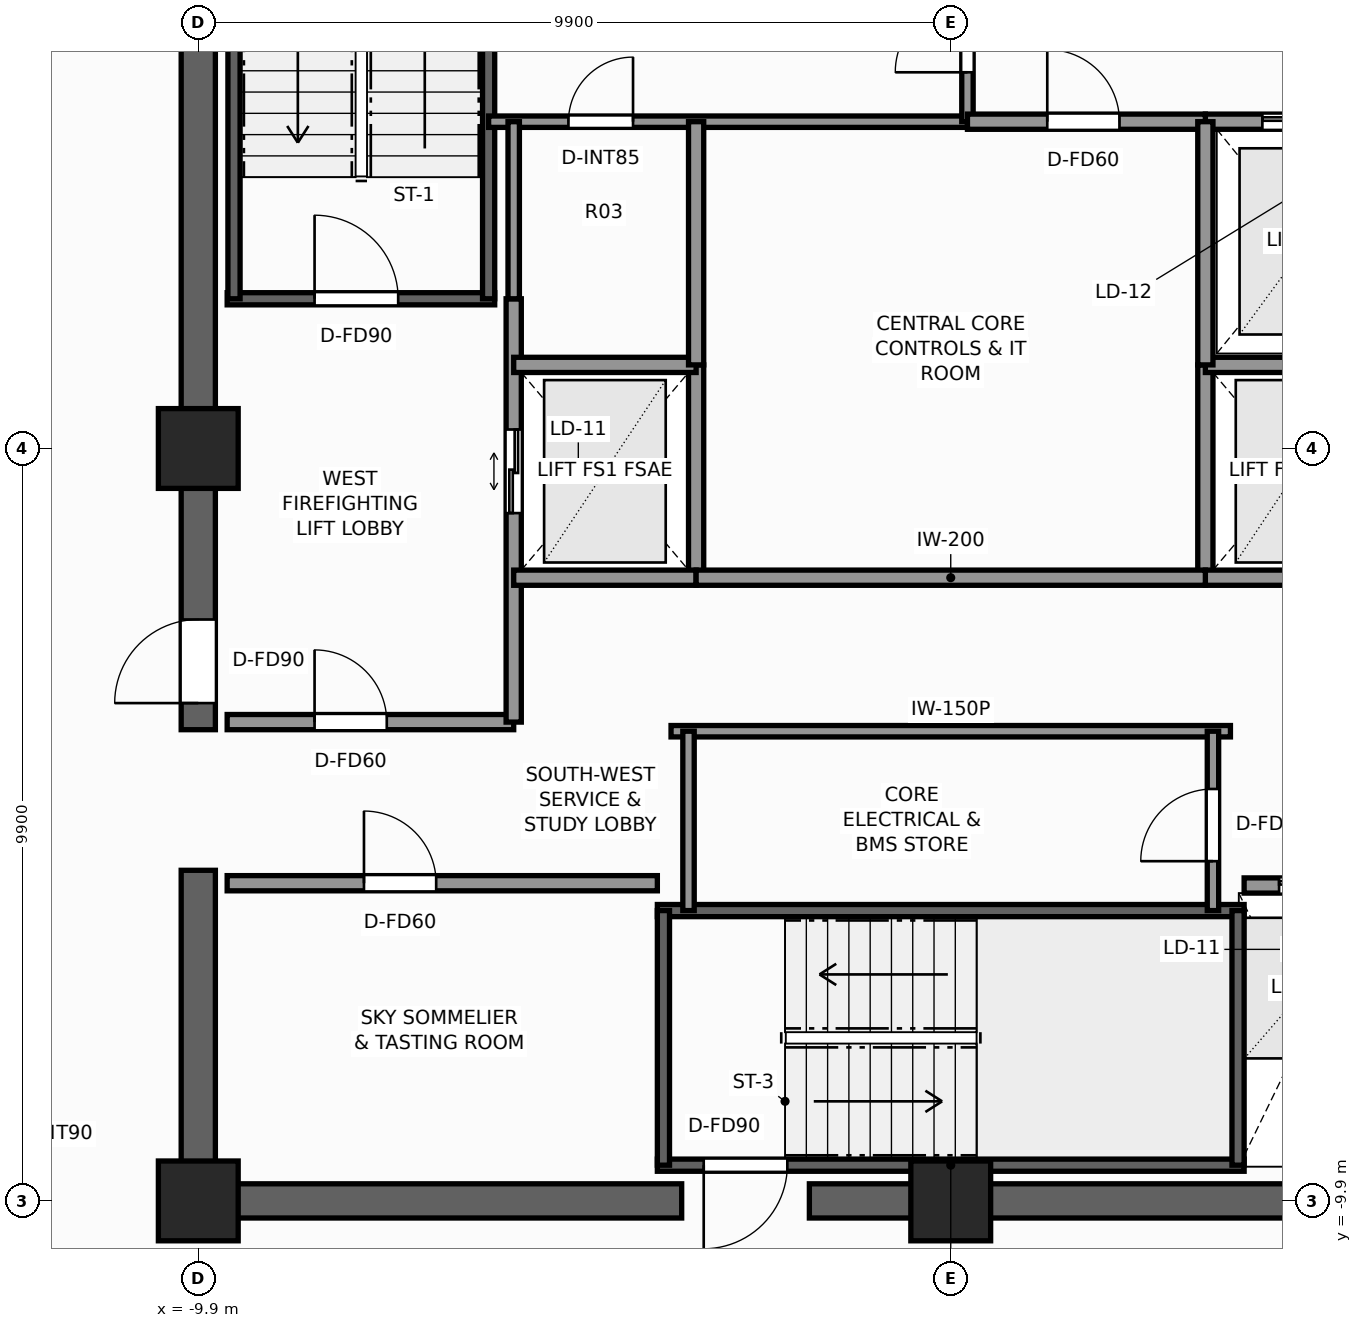
"""IFC4 building model, lengths in metres.
Left out: names, types, materials, properties, quantities, classifications, styles, units other than length and angle.
Written with IfcOpenShell. Run it as: python <this file> out.ifc"""

import sys

from ifc_helpers import new_model, si_unit, direction, frame, frame_2d, origin, origin_2d, place, context, subcontext, project, spatial, rectangle, extrude, element, fill, save


model = new_model("IFC4")
c1 = context("Model", 3, precision=1e-05, world=origin(), true_north=direction((0.0, 1.0)))
c2 = subcontext(c1, "Body", "Model", "MODEL_VIEW")
j1 = project(units=[si_unit("LENGTHUNIT", "METRE"), si_unit("PLANEANGLEUNIT", "RADIAN")], contexts=[c1])
p1 = place(None, origin())
s1 = spatial("IfcSite", under=j1, at=p1, CompositionType="ELEMENT")
p2 = place(p1, origin())
s2 = spatial("IfcBuilding", under=s1, at=p2, CompositionType="ELEMENT")
p3 = place(p2, frame((0.0, 0.0, 247.9)))
s3 = spatial("IfcBuildingStorey", under=s2, at=p3, CompositionType="ELEMENT", Elevation=247.9)
p4 = place(p3, frame((10.125, -9.9, 0.0), z_axis=(0.0, 0.0, 1.0), x_axis=(-1.0, 0.0, 0.0)))
e1 = element("IfcWall", 1, at=p4, inside=s3, PredefinedType="SHEAR", context=c2, shape_type="SweptSolid", body=[
    extrude(rectangle(XDim=11.985, YDim=0.45, at=frame_2d((5.993, 0.0))), origin(), (0.0, 0.0, 1.0), 3.5),
])
p5 = place(p3, frame((-3.54, -9.9, 0.0), z_axis=(0.0, 0.0, 1.0), x_axis=(-1.0, 0.0, 0.0)))
e2 = element("IfcWall", 2, at=p5, inside=s3, PredefinedType="SHEAR", context=c2, shape_type="SweptSolid", body=[
    extrude(rectangle(XDim=6.585, YDim=0.45, at=frame_2d((3.292, 0.0))), origin(), (0.0, 0.0, 1.0), 3.5),
])
p6 = place(p3, frame((-9.9, -9.675, 0.0), z_axis=(0.0, 0.0, 1.0), x_axis=(0.0, 1.0, 0.0)))
e3 = element("IfcWall", 3, at=p6, inside=s3, PredefinedType="SHEAR", context=c2, shape_type="SweptSolid", body=[
    extrude(rectangle(XDim=4.125, YDim=0.45, at=frame_2d((2.062, 0.0))), origin(), (0.0, 0.0, 1.0), 3.5),
])
p7 = place(p3, frame((-9.9, -3.7, 0.0), z_axis=(0.0, 0.0, 1.0), x_axis=(0.0, 1.0, 0.0)))
e4 = element("IfcWall", 4, at=p7, inside=s3, PredefinedType="SHEAR", context=c2, shape_type="SweptSolid", body=[
    extrude(rectangle(XDim=13.375, YDim=0.45, at=frame_2d((6.688, 0.0))), origin(), (0.0, 0.0, 1.0), 3.5),
])
p8 = place(p7, frame((0.35, 0.0, 0.0)))
e5 = element("IfcOpeningElement", 5, at=p8, cuts=e4, PredefinedType="OPENING", context=c2, shape_type="SweptSolid", body=[
    extrude(rectangle(XDim=1.1, YDim=2.2, at=frame_2d((0.55, 1.1))), frame((0.0, 0.235, 0.0), z_axis=(0.0, -1.0, 0.0), x_axis=(1.0, 0.0, 0.0)), (0.0, 0.0, 1.0), 0.47),
])
for number, where, z_axis, x_axis in (
    (6, (-9.9, -9.9, 0.0), (0.0, 0.0, 1.0), (1.0, 0.0, 0.0)),
    (7, (0.0, -9.9, 0.0), (0.0, 0.0, 1.0), (1.0, 0.0, 0.0)),
    (8, (-9.9, 0.0, 0.0), (0.0, 0.0, 1.0), (1.0, 0.0, 0.0)),
):
    element("IfcColumn", number, at=place(p3, frame(where, z_axis=z_axis, x_axis=x_axis)), inside=s3, PredefinedType="COLUMN", context=c2, shape_type="SweptSolid", body=[
        extrude(rectangle(XDim=1.05, YDim=1.05, at=origin_2d()), origin(), (0.0, 0.0, 1.0), 3.5),
    ])
p9 = place(p3, frame((-9.52, 1.97, 0.0), z_axis=(0.0, 0.0, 1.0), x_axis=(1.0, 0.0, 0.0)))
e9 = element("IfcWall", 9, at=p9, inside=s3, PredefinedType="SHEAR", context=c2, shape_type="SweptSolid", body=[
    extrude(rectangle(XDim=3.52, YDim=0.16, at=frame_2d((1.76, 0.0))), origin(), (0.0, 0.0, 1.0), 3.5),
])
p10 = place(p9, frame((1.15, 0.0, 0.0)))
e10 = element("IfcOpeningElement", 10, at=p10, cuts=e9, PredefinedType="OPENING", context=c2, shape_type="SweptSolid", body=[
    extrude(rectangle(XDim=1.1, YDim=2.2, at=frame_2d((0.55, 1.1))), frame((0.0, 0.09, 0.0), z_axis=(0.0, -1.0, 0.0), x_axis=(1.0, 0.0, 0.0)), (0.0, 0.0, 1.0), 0.18),
])
for number, where, z_axis, x_axis in (
    (11, (-9.43, 1.97, 0.0), (0.0, 0.0, 1.0), (0.0, 1.0, 0.0)),
    (12, (-6.08, 1.97, 0.0), (0.0, 0.0, 1.0), (0.0, 1.0, 0.0)),
):
    element("IfcWall", number, at=place(p3, frame(where, z_axis=z_axis, x_axis=x_axis)), inside=s3, PredefinedType="SHEAR", context=c2, shape_type="SweptSolid", body=[
        extrude(rectangle(XDim=7.56, YDim=0.16, at=frame_2d((3.78, 0.0))), origin(), (0.0, 0.0, 1.0), 3.5),
    ])
p11 = place(p3, frame((3.86, -9.43, 0.0), z_axis=(0.0, 0.0, 1.0), x_axis=(-1.0, 0.0, 0.0)))
e13 = element("IfcWall", 13, at=p11, inside=s3, PredefinedType="SHEAR", context=c2, shape_type="SweptSolid", body=[
    extrude(rectangle(XDim=7.72, YDim=0.16, at=frame_2d((3.86, 0.0))), origin(), (0.0, 0.0, 1.0), 3.5),
])
p12 = place(p11, frame((6.01, 0.0, 0.0)))
e14 = element("IfcOpeningElement", 14, at=p12, cuts=e13, PredefinedType="OPENING", context=c2, shape_type="SweptSolid", body=[
    extrude(rectangle(XDim=1.1, YDim=2.2, at=frame_2d((0.55, 1.1))), frame((0.0, 0.09, 0.0), z_axis=(0.0, -1.0, 0.0), x_axis=(1.0, 0.0, 0.0)), (0.0, 0.0, 1.0), 0.18),
])
p13 = place(p3, frame((-3.86, -6.08, 0.0), z_axis=(0.0, 0.0, 1.0), x_axis=(1.0, 0.0, 0.0)))
e15 = element("IfcWall", 15, at=p13, inside=s3, PredefinedType="SHEAR", context=c2, shape_type="SweptSolid", body=[
    extrude(rectangle(XDim=7.72, YDim=0.16, at=frame_2d((3.86, 0.0))), origin(), (0.0, 0.0, 1.0), 3.5),
])
for number, where, z_axis, x_axis in (
    (16, (-3.78, -9.43, 0.0), (0.0, 0.0, 1.0), (0.0, 1.0, 0.0)),
    (17, (3.78, -9.43, 0.0), (0.0, 0.0, 1.0), (0.0, 1.0, 0.0)),
):
    element("IfcWall", number, at=place(p3, frame(where, z_axis=z_axis, x_axis=x_axis)), inside=s3, PredefinedType="SHEAR", context=c2, shape_type="SweptSolid", body=[
        extrude(rectangle(XDim=3.35, YDim=0.16, at=frame_2d((1.675, 0.0))), origin(), (0.0, 0.0, 1.0), 3.5),
    ])
p14 = place(p3, frame((-9.52, -3.6, 0.0), z_axis=(0.0, 0.0, 1.0), x_axis=(1.0, 0.0, 0.0)))
e18 = element("IfcWall", 18, at=p14, inside=s3, PredefinedType="SOLIDWALL", context=c2, shape_type="SweptSolid", body=[
    extrude(rectangle(XDim=3.77, YDim=0.2, at=frame_2d((1.885, 0.0))), origin(), (0.0, 0.0, 1.0), 3.25),
])
p15 = place(p14, frame((1.15, 0.0, 0.0)))
e19 = element("IfcOpeningElement", 19, at=p15, cuts=e18, PredefinedType="OPENING", context=c2, shape_type="SweptSolid", body=[
    extrude(rectangle(XDim=0.95, YDim=2.06, at=frame_2d((0.475, 1.03))), frame((0.0, 0.11, 0.0), z_axis=(0.0, -1.0, 0.0), x_axis=(1.0, 0.0, 0.0)), (0.0, 0.0, 1.0), 0.22),
])
p16 = place(p3, frame((-5.75, -3.6, 0.0), z_axis=(0.0, 0.0, 1.0), x_axis=(0.0, 1.0, 0.0)))
e20 = element("IfcWall", 20, at=p16, inside=s3, PredefinedType="SOLIDWALL", context=c2, shape_type="SweptSolid", body=[
    extrude(rectangle(XDim=5.57, YDim=0.2, at=frame_2d((2.785, 0.0))), origin(), (0.0, 0.0, 1.0), 3.25),
])
p17 = place(p16, frame((2.75, 0.0, 0.0)))
e21 = element("IfcOpeningElement", 21, at=p17, cuts=e20, PredefinedType="OPENING", context=c2, shape_type="SweptSolid", body=[
    extrude(rectangle(XDim=1.1, YDim=2.2, at=frame_2d((0.55, 1.1))), frame((0.0, 0.11, 0.0), z_axis=(0.0, -1.0, 0.0), x_axis=(1.0, 0.0, 0.0)), (0.0, 0.0, 1.0), 0.22),
])
p18 = place(p3, frame((-3.35, -1.7, 0.0), z_axis=(0.0, 0.0, 1.0), x_axis=(0.0, 1.0, 0.0)))
e22 = element("IfcWall", 22, at=p18, inside=s3, PredefinedType="SOLIDWALL", context=c2, shape_type="SweptSolid", body=[
    extrude(rectangle(XDim=2.8, YDim=0.2, at=frame_2d((1.4, 0.0))), origin(), (0.0, 0.0, 1.0), 3.25),
])
for number, where, z_axis, x_axis in (
    (23, (-5.75, -1.7, 0.0), (0.0, 0.0, 1.0), (1.0, 0.0, 0.0)),
    (24, (-5.75, 1.1, 0.0), (0.0, 0.0, 1.0), (1.0, 0.0, 0.0)),
):
    element("IfcWall", number, at=place(p3, frame(where, z_axis=z_axis, x_axis=x_axis)), inside=s3, PredefinedType="SOLIDWALL", context=c2, shape_type="SweptSolid", body=[
        extrude(rectangle(XDim=2.4, YDim=0.2, at=frame_2d((1.2, 0.0))), origin(), (0.0, 0.0, 1.0), 3.25),
    ])
p19 = place(p3, frame((3.35, -1.7, 0.0), z_axis=(0.0, 0.0, 1.0), x_axis=(0.0, 1.0, 0.0)))
e25 = element("IfcWall", 25, at=p19, inside=s3, PredefinedType="SOLIDWALL", context=c2, shape_type="SweptSolid", body=[
    extrude(rectangle(XDim=2.8, YDim=0.2, at=frame_2d((1.4, 0.0))), origin(), (0.0, 0.0, 1.0), 3.25),
])
for number, where, z_axis, x_axis in (
    (26, (3.35, -1.7, 0.0), (0.0, 0.0, 1.0), (1.0, 0.0, 0.0)),
    (27, (3.35, 1.1, 0.0), (0.0, 0.0, 1.0), (1.0, 0.0, 0.0)),
):
    element("IfcWall", number, at=place(p3, frame(where, z_axis=z_axis, x_axis=x_axis)), inside=s3, PredefinedType="SOLIDWALL", context=c2, shape_type="SweptSolid", body=[
        extrude(rectangle(XDim=2.4, YDim=0.2, at=frame_2d((1.2, 0.0))), origin(), (0.0, 0.0, 1.0), 3.25),
    ])
p20 = place(p3, frame((3.35, 4.3, 0.0), z_axis=(0.0, 0.0, 1.0), x_axis=(1.0, 0.0, 0.0)))
e28 = element("IfcWall", 28, at=p20, inside=s3, PredefinedType="SOLIDWALL", context=c2, shape_type="SweptSolid", body=[
    extrude(rectangle(XDim=2.73, YDim=0.2, at=frame_2d((1.365, 0.0))), origin(), (0.0, 0.0, 1.0), 3.25),
])
p21 = place(p20, frame((0.75, 0.0, 0.0)))
e29 = element("IfcOpeningElement", 29, at=p21, cuts=e28, PredefinedType="OPENING", context=c2, shape_type="SweptSolid", body=[
    extrude(rectangle(XDim=1.2, YDim=2.25, at=frame_2d((0.6, 1.125))), frame((0.0, 0.11, 0.0), z_axis=(0.0, -1.0, 0.0), x_axis=(1.0, 0.0, 0.0)), (0.0, 0.0, 1.0), 0.22),
])
p22 = place(p3, frame((-6.08, 4.3, 0.0), z_axis=(0.0, 0.0, 1.0), x_axis=(1.0, 0.0, 0.0)))
e30 = element("IfcWall", 30, at=p22, inside=s3, PredefinedType="PARTITIONING", context=c2, shape_type="SweptSolid", body=[
    extrude(rectangle(XDim=6.3, YDim=0.15, at=frame_2d((3.15, 0.0))), origin(), (0.0, 0.0, 1.0), 3.25),
])
p23 = place(p22, frame((1.05, 0.0, 0.0)))
e31 = element("IfcOpeningElement", 31, at=p23, cuts=e30, PredefinedType="OPENING", context=c2, shape_type="SweptSolid", body=[
    extrude(rectangle(XDim=0.85, YDim=2.03, at=frame_2d((0.425, 1.015))), frame((0.0, 0.085, 0.0), z_axis=(0.0, -1.0, 0.0), x_axis=(1.0, 0.0, 0.0)), (0.0, 0.0, 1.0), 0.17),
])
p24 = place(p3, frame((0.22, 4.3, 0.0), z_axis=(0.0, 0.0, 1.0), x_axis=(0.0, 1.0, 0.0)))
e32 = element("IfcWall", 32, at=p24, inside=s3, PredefinedType="PARTITIONING", context=c2, shape_type="SweptSolid", body=[
    extrude(rectangle(XDim=5.22, YDim=0.15, at=frame_2d((2.61, 0.0))), origin(), (0.0, 0.0, 1.0), 3.25),
])
p25 = place(p24, frame((0.65, 0.0, 0.0)))
e33 = element("IfcOpeningElement", 33, at=p25, cuts=e32, PredefinedType="OPENING", context=c2, shape_type="SweptSolid", body=[
    extrude(rectangle(XDim=0.95, YDim=2.06, at=frame_2d((0.475, 1.03))), frame((0.0, 0.085, 0.0), z_axis=(0.0, -1.0, 0.0), x_axis=(1.0, 0.0, 0.0)), (0.0, 0.0, 1.0), 0.17),
])
p26 = place(p3, frame((-9.52, -5.72, 0.0), z_axis=(0.0, 0.0, 1.0), x_axis=(1.0, 0.0, 0.0)))
e34 = element("IfcWall", 34, at=p26, inside=s3, PredefinedType="SOLIDWALL", context=c2, shape_type="SweptSolid", body=[
    extrude(rectangle(XDim=5.66, YDim=0.2, at=frame_2d((2.83, 0.0))), origin(), (0.0, 0.0, 1.0), 3.25),
])
p27 = place(p26, frame((1.8, 0.0, 0.0)))
e35 = element("IfcOpeningElement", 35, at=p27, cuts=e34, PredefinedType="OPENING", context=c2, shape_type="SweptSolid", body=[
    extrude(rectangle(XDim=0.95, YDim=2.06, at=frame_2d((0.475, 1.03))), frame((0.0, 0.11, 0.0), z_axis=(0.0, -1.0, 0.0), x_axis=(1.0, 0.0, 0.0)), (0.0, 0.0, 1.0), 0.22),
])
p28 = place(p3, frame((3.86, -5.75, 0.0), z_axis=(0.0, 0.0, 1.0), x_axis=(1.0, 0.0, 0.0)))
e36 = element("IfcWall", 36, at=p28, inside=s3, PredefinedType="SOLIDWALL", context=c2, shape_type="SweptSolid", body=[
    extrude(rectangle(XDim=5.66, YDim=0.2, at=frame_2d((2.83, 0.0))), origin(), (0.0, 0.0, 1.0), 3.25),
])
p29 = place(p28, frame((0.46, 0.0, 0.0)))
e37 = element("IfcOpeningElement", 37, at=p29, cuts=e36, PredefinedType="OPENING", context=c2, shape_type="SweptSolid", body=[
    extrude(rectangle(XDim=1.1, YDim=2.2, at=frame_2d((0.55, 1.1))), frame((0.0, 0.11, 0.0), z_axis=(0.0, -1.0, 0.0), x_axis=(1.0, 0.0, 0.0)), (0.0, 0.0, 1.0), 0.22),
])
p30 = place(p28, frame((2.39, 0.0, 0.0)))
e38 = element("IfcOpeningElement", 38, at=p30, cuts=e36, PredefinedType="OPENING", context=c2, shape_type="SweptSolid", body=[
    extrude(rectangle(XDim=1.1, YDim=2.2, at=frame_2d((0.55, 1.1))), frame((0.0, 0.11, 0.0), z_axis=(0.0, -1.0, 0.0), x_axis=(1.0, 0.0, 0.0)), (0.0, 0.0, 1.0), 0.22),
])
p31 = place(p28, frame((4.32, 0.0, 0.0)))
e39 = element("IfcOpeningElement", 39, at=p31, cuts=e36, PredefinedType="OPENING", context=c2, shape_type="SweptSolid", body=[
    extrude(rectangle(XDim=1.1, YDim=2.2, at=frame_2d((0.55, 1.1))), frame((0.0, 0.11, 0.0), z_axis=(0.0, -1.0, 0.0), x_axis=(1.0, 0.0, 0.0)), (0.0, 0.0, 1.0), 0.22),
])
p32 = place(p3, frame((0.22, 4.3, 0.0), z_axis=(0.0, 0.0, 1.0), x_axis=(1.0, 0.0, 0.0)))
e40 = element("IfcWall", 40, at=p32, inside=s3, PredefinedType="SOLIDWALL", context=c2, shape_type="SweptSolid", body=[
    extrude(rectangle(XDim=3.13, YDim=0.2, at=frame_2d((1.565, 0.0))), origin(), (0.0, 0.0, 1.0), 3.25),
])
p33 = place(p32, frame((1.05, 0.0, 0.0)))
e41 = element("IfcOpeningElement", 41, at=p33, cuts=e40, PredefinedType="OPENING", context=c2, shape_type="SweptSolid", body=[
    extrude(rectangle(XDim=0.95, YDim=2.06, at=frame_2d((0.475, 1.03))), frame((0.0, 0.11, 0.0), z_axis=(0.0, -1.0, 0.0), x_axis=(1.0, 0.0, 0.0)), (0.0, 0.0, 1.0), 0.22),
])
p34 = place(p3, frame((-3.35, -1.7, 0.0), z_axis=(0.0, 0.0, 1.0), x_axis=(1.0, 0.0, 0.0)))
e42 = element("IfcWall", 42, at=p34, inside=s3, PredefinedType="SOLIDWALL", context=c2, shape_type="SweptSolid", body=[
    extrude(rectangle(XDim=6.7, YDim=0.2, at=frame_2d((3.35, 0.0))), origin(), (0.0, 0.0, 1.0), 3.25),
])
for number, where, z_axis, x_axis in (
    (43, (-3.35, 1.1, 0.0), (0.0, 0.0, 1.0), (0.0, 1.0, 0.0)),
    (44, (3.35, 1.1, 0.0), (0.0, 0.0, 1.0), (0.0, 1.0, 0.0)),
):
    element("IfcWall", number, at=place(p3, frame(where, z_axis=z_axis, x_axis=x_axis)), inside=s3, PredefinedType="SOLIDWALL", context=c2, shape_type="SweptSolid", body=[
        extrude(rectangle(XDim=3.2, YDim=0.2, at=frame_2d((1.6, 0.0))), origin(), (0.0, 0.0, 1.0), 3.25),
    ])
p35 = place(p3, frame((-3.68, -3.72, 0.0), z_axis=(0.0, 0.0, 1.0), x_axis=(1.0, 0.0, 0.0)))
e45 = element("IfcWall", 45, at=p35, inside=s3, PredefinedType="PARTITIONING", context=c2, shape_type="SweptSolid", body=[
    extrude(rectangle(XDim=7.36, YDim=0.15, at=frame_2d((3.68, 0.0))), origin(), (0.0, 0.0, 1.0), 3.25),
])
p36 = place(p3, frame((3.45, -6.08, 0.0), z_axis=(0.0, 0.0, 1.0), x_axis=(0.0, 1.0, 0.0)))
e46 = element("IfcWall", 46, at=p36, inside=s3, PredefinedType="PARTITIONING", context=c2, shape_type="SweptSolid", body=[
    extrude(rectangle(XDim=2.36, YDim=0.15, at=frame_2d((1.18, 0.0))), origin(), (0.0, 0.0, 1.0), 3.25),
])
p37 = place(p36, frame((0.65, 0.0, 0.0)))
e47 = element("IfcOpeningElement", 47, at=p37, cuts=e46, PredefinedType="OPENING", context=c2, shape_type="SweptSolid", body=[
    extrude(rectangle(XDim=0.95, YDim=2.06, at=frame_2d((0.475, 1.03))), frame((0.0, 0.085, 0.0), z_axis=(0.0, -1.0, 0.0), x_axis=(1.0, 0.0, 0.0)), (0.0, 0.0, 1.0), 0.17),
])
p38 = place(p3, frame((-3.45, -6.08, 0.0), z_axis=(0.0, 0.0, 1.0), x_axis=(0.0, 1.0, 0.0)))
e48 = element("IfcWall", 48, at=p38, inside=s3, PredefinedType="PARTITIONING", context=c2, shape_type="SweptSolid", body=[
    extrude(rectangle(XDim=2.36, YDim=0.15, at=frame_2d((1.18, 0.0))), origin(), (0.0, 0.0, 1.0), 3.25),
])
p39 = place(p3, frame((-5.75, 1.97, 0.0), z_axis=(0.0, 0.0, 1.0), x_axis=(0.0, 1.0, 0.0)))
e49 = element("IfcWall", 49, at=p39, inside=s3, PredefinedType="PARTITIONING", context=c2, shape_type="SweptSolid", body=[
    extrude(rectangle(XDim=2.33, YDim=0.15, at=frame_2d((1.165, 0.0))), origin(), (0.0, 0.0, 1.0), 3.25),
])
p40 = place(p10, origin())
e50 = element("IfcDoor", 50, at=p40, inside=s3, OperationType="SINGLE_SWING_LEFT", PredefinedType="DOOR", context=c2, shape_type="SweptSolid", body=[
    extrude(rectangle(XDim=1.1, YDim=2.2, at=frame_2d((0.55, 1.1))), frame((0.0, 0.025, 0.0), z_axis=(0.0, -1.0, 0.0), x_axis=(1.0, 0.0, 0.0)), (0.0, 0.0, 1.0), 0.05),
])
fill(e10, e50)
p41 = place(p12, origin())
e51 = element("IfcDoor", 51, at=p41, inside=s3, OperationType="SINGLE_SWING_RIGHT", PredefinedType="DOOR", context=c2, shape_type="SweptSolid", body=[
    extrude(rectangle(XDim=1.1, YDim=2.2, at=frame_2d((0.55, 1.1))), frame((0.0, 0.025, 0.0), z_axis=(0.0, -1.0, 0.0), x_axis=(1.0, 0.0, 0.0)), (0.0, 0.0, 1.0), 0.05),
])
fill(e14, e51)
p42 = place(p8, origin())
e52 = element("IfcDoor", 52, at=p42, inside=s3, OperationType="SINGLE_SWING_LEFT", PredefinedType="DOOR", context=c2, shape_type="SweptSolid", body=[
    extrude(rectangle(XDim=1.1, YDim=2.2, at=frame_2d((0.55, 1.1))), frame((0.0, 0.025, 0.0), z_axis=(0.0, -1.0, 0.0), x_axis=(1.0, 0.0, 0.0)), (0.0, 0.0, 1.0), 0.05),
])
fill(e5, e52)
p43 = place(p17, origin())
e53 = element("IfcDoor", 53, at=p43, inside=s3, OperationType="DOUBLE_DOOR_SLIDING", PredefinedType="DOOR", context=c2, shape_type="SweptSolid", body=[
    extrude(rectangle(XDim=1.1, YDim=2.2, at=frame_2d((0.55, 1.1))), frame((0.0, 0.025, 0.0), z_axis=(0.0, -1.0, 0.0), x_axis=(1.0, 0.0, 0.0)), (0.0, 0.0, 1.0), 0.05),
])
fill(e21, e53)
p44 = place(p21, origin())
e54 = element("IfcDoor", 54, at=p44, inside=s3, OperationType="DOUBLE_DOOR_SLIDING", PredefinedType="DOOR", context=c2, shape_type="SweptSolid", body=[
    extrude(rectangle(XDim=1.2, YDim=2.25, at=frame_2d((0.6, 1.125))), frame((0.0, 0.025, 0.0), z_axis=(0.0, -1.0, 0.0), x_axis=(1.0, 0.0, 0.0)), (0.0, 0.0, 1.0), 0.05),
])
fill(e29, e54)
p45 = place(p25, origin())
e55 = element("IfcDoor", 55, at=p45, inside=s3, OperationType="SINGLE_SWING_LEFT", PredefinedType="DOOR", context=c2, shape_type="SweptSolid", body=[
    extrude(rectangle(XDim=0.95, YDim=2.06, at=frame_2d((0.475, 1.03))), frame((0.0, 0.025, 0.0), z_axis=(0.0, -1.0, 0.0), x_axis=(1.0, 0.0, 0.0)), (0.0, 0.0, 1.0), 0.05),
])
fill(e33, e55)
p46 = place(p27, origin())
e56 = element("IfcDoor", 56, at=p46, inside=s3, OperationType="SINGLE_SWING_LEFT", PredefinedType="DOOR", context=c2, shape_type="SweptSolid", body=[
    extrude(rectangle(XDim=0.95, YDim=2.06, at=frame_2d((0.475, 1.03))), frame((0.0, 0.025, 0.0), z_axis=(0.0, -1.0, 0.0), x_axis=(1.0, 0.0, 0.0)), (0.0, 0.0, 1.0), 0.05),
])
fill(e35, e56)
p47 = place(p15, origin())
e57 = element("IfcDoor", 57, at=p47, inside=s3, OperationType="SINGLE_SWING_LEFT", PredefinedType="DOOR", context=c2, shape_type="SweptSolid", body=[
    extrude(rectangle(XDim=0.95, YDim=2.06, at=frame_2d((0.475, 1.03))), frame((0.0, 0.025, 0.0), z_axis=(0.0, -1.0, 0.0), x_axis=(1.0, 0.0, 0.0)), (0.0, 0.0, 1.0), 0.05),
])
fill(e19, e57)
p48 = place(p29, origin())
e58 = element("IfcDoor", 58, at=p48, inside=s3, OperationType="DOUBLE_DOOR_SLIDING", PredefinedType="DOOR", context=c2, shape_type="SweptSolid", body=[
    extrude(rectangle(XDim=1.1, YDim=2.2, at=frame_2d((0.55, 1.1))), frame((0.0, 0.025, 0.0), z_axis=(0.0, -1.0, 0.0), x_axis=(1.0, 0.0, 0.0)), (0.0, 0.0, 1.0), 0.05),
])
fill(e37, e58)
p49 = place(p33, origin())
e59 = element("IfcDoor", 59, at=p49, inside=s3, OperationType="SINGLE_SWING_LEFT", PredefinedType="DOOR", context=c2, shape_type="SweptSolid", body=[
    extrude(rectangle(XDim=0.95, YDim=2.06, at=frame_2d((0.475, 1.03))), frame((0.0, 0.025, 0.0), z_axis=(0.0, -1.0, 0.0), x_axis=(1.0, 0.0, 0.0)), (0.0, 0.0, 1.0), 0.05),
])
fill(e41, e59)
p50 = place(p37, origin())
e60 = element("IfcDoor", 60, at=p50, inside=s3, OperationType="SINGLE_SWING_LEFT", PredefinedType="DOOR", context=c2, shape_type="SweptSolid", body=[
    extrude(rectangle(XDim=0.95, YDim=2.06, at=frame_2d((0.475, 1.03))), frame((0.0, 0.025, 0.0), z_axis=(0.0, -1.0, 0.0), x_axis=(1.0, 0.0, 0.0)), (0.0, 0.0, 1.0), 0.05),
])
fill(e47, e60)
p51 = place(p23, origin())
e61 = element("IfcDoor", 61, at=p51, inside=s3, OperationType="SINGLE_SWING_RIGHT", PredefinedType="DOOR", context=c2, shape_type="SweptSolid", body=[
    extrude(rectangle(XDim=0.85, YDim=2.03, at=frame_2d((0.425, 1.015))), frame((0.0, 0.025, 0.0), z_axis=(0.0, -1.0, 0.0), x_axis=(1.0, 0.0, 0.0)), (0.0, 0.0, 1.0), 0.05),
])
fill(e31, e61)
save(model, sys.argv[1])
